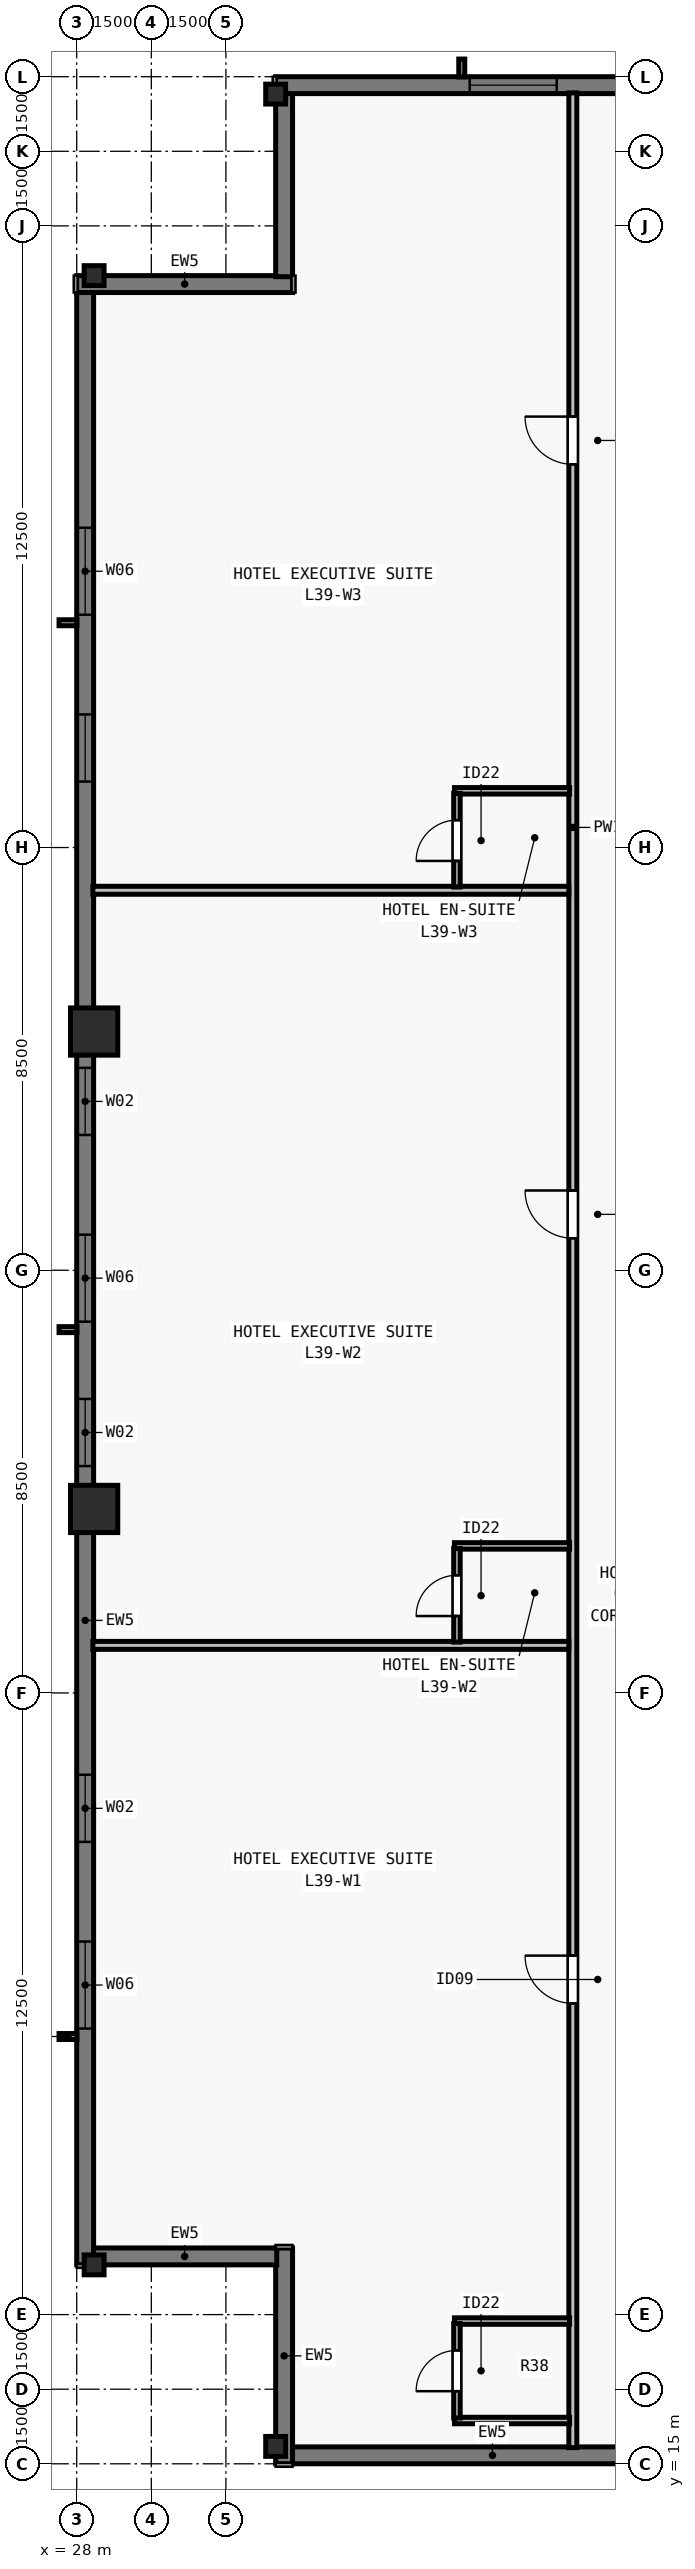
"""IFC4 building model, lengths in metres.
Left out: names, types, materials, properties, quantities, classifications, styles, units other than length and angle.
Written with IfcOpenShell. Run it as: python <this file> out.ifc"""

import sys

from ifc_helpers import new_model, si_unit, direction, frame, frame_2d, origin, origin_2d, place, context, subcontext, project, spatial, rectangle, i_section, extrude, element, fill, save


model = new_model("IFC4")
c1 = context("Model", 3, precision=1e-05, world=origin(), true_north=direction((0.0, 1.0)))
c2 = subcontext(c1, "Body", "Model", "MODEL_VIEW")
j1 = project(units=[si_unit("LENGTHUNIT", "METRE"), si_unit("PLANEANGLEUNIT", "RADIAN")], contexts=[c1])
p1 = place(None, origin())
s1 = spatial("IfcSite", under=j1, at=p1, CompositionType="ELEMENT")
p2 = place(p1, origin())
s2 = spatial("IfcBuilding", under=s1, at=p2, CompositionType="ELEMENT")
p3 = place(p2, frame((0.0, 0.0, 144.5)))
s3 = spatial("IfcBuildingStorey", under=s2, at=p3, CompositionType="ELEMENT", Elevation=144.5)
for number, where, z_axis, x_axis in (
    (1, (32.0, 15.35, 0.0), (0.0, 0.0, 1.0), (1.0, 0.0, 0.0)),
    (2, (32.0, 62.65, 0.0), (0.0, 0.0, 1.0), (1.0, 0.0, 0.0)),
    (3, (28.35, 59.0, 0.0), (0.0, 0.0, 1.0), (0.0, 1.0, 0.0)),
):
    element("IfcColumn", number, at=place(p3, frame(where, z_axis=z_axis, x_axis=x_axis)), inside=s3, PredefinedType="COLUMN", context=c2, shape_type="SweptSolid", body=[
        extrude(i_section(OverallWidth=0.4, OverallDepth=0.4, WebThickness=0.022, FlangeThickness=0.036, at=origin_2d()), origin(), (0.0, 0.0, 1.0), 3.5),
    ])
for number, where, z_axis, x_axis in (
    (4, (28.35, 43.8, 0.0), (0.0, 0.0, 1.0), (0.0, 1.0, 0.0)),
    (5, (28.35, 34.2, 0.0), (0.0, 0.0, 1.0), (0.0, 1.0, 0.0)),
):
    element("IfcColumn", number, at=place(p3, frame(where, z_axis=z_axis, x_axis=x_axis)), inside=s3, PredefinedType="COLUMN", context=c2, shape_type="SweptSolid", body=[
        extrude(rectangle(XDim=0.95, YDim=0.95, at=origin_2d()), origin(), (0.0, 0.0, 1.0), 3.5),
    ])
p4 = place(p3, frame((28.35, 19.0, 0.0), z_axis=(0.0, 0.0, 1.0), x_axis=(0.0, 1.0, 0.0)))
e6 = element("IfcColumn", 6, at=p4, inside=s3, PredefinedType="COLUMN", context=c2, shape_type="SweptSolid", body=[
    extrude(i_section(OverallWidth=0.4, OverallDepth=0.4, WebThickness=0.022, FlangeThickness=0.036, at=origin_2d()), origin(), (0.0, 0.0, 1.0), 3.5),
])
p5 = place(p3, frame((40.4, 15.17, 0.0), z_axis=(0.0, 0.0, 1.0), x_axis=(-1.0, 0.0, 0.0)))
e7 = element("IfcWall", 7, at=p5, inside=s3, PredefinedType="SOLIDWALL", context=c2, shape_type="SweptSolid", body=[
    extrude(rectangle(XDim=8.082, YDim=0.34, at=frame_2d((4.041, 0.0))), origin(), (0.0, 0.0, 1.0), 3.28),
])
p6 = place(p3, frame((32.17, 15.0, 0.0), z_axis=(0.0, 0.0, 1.0), x_axis=(0.0, 1.0, 0.0)))
e8 = element("IfcWall", 8, at=p6, inside=s3, PredefinedType="SOLIDWALL", context=c2, shape_type="SweptSolid", body=[
    extrude(rectangle(XDim=4.34, YDim=0.34, at=frame_2d((2.17, 0.0))), origin(), (0.0, 0.0, 1.0), 3.28),
])
p7 = place(p3, frame((32.022, 19.17, 0.0), z_axis=(0.0, 0.0, 1.0), x_axis=(-1.0, 0.0, 0.0)))
e9 = element("IfcWall", 9, at=p7, inside=s3, PredefinedType="SOLIDWALL", context=c2, shape_type="SweptSolid", body=[
    extrude(rectangle(XDim=3.704, YDim=0.34, at=frame_2d((1.852, 0.0))), origin(), (0.0, 0.0, 1.0), 3.28),
])
p8 = place(p3, frame((28.17, 19.0, 0.0), z_axis=(0.0, 0.0, 1.0), x_axis=(0.0, 1.0, 0.0)))
e10 = element("IfcWall", 10, at=p8, inside=s3, PredefinedType="SOLIDWALL", context=c2, shape_type="SweptSolid", body=[
    extrude(rectangle(XDim=39.682, YDim=0.34, at=frame_2d((19.841, 0.0))), origin(), (0.0, 0.0, 1.0), 3.28),
])
p9 = place(p8, frame((4.752, 0.0, 0.8)))
e11 = element("IfcOpeningElement", 11, at=p9, cuts=e10, PredefinedType="OPENING", context=c2, shape_type="SweptSolid", body=[
    extrude(rectangle(XDim=1.75, YDim=1.66, at=frame_2d((0.875, 0.83))), frame((0.0, 0.18, 0.0), z_axis=(0.0, -1.0, 0.0), x_axis=(1.0, 0.0, 0.0)), (0.0, 0.0, 1.0), 0.36),
])
p10 = place(p8, frame((8.505, 0.0, 0.8)))
e12 = element("IfcOpeningElement", 12, at=p10, cuts=e10, PredefinedType="OPENING", context=c2, shape_type="SweptSolid", body=[
    extrude(rectangle(XDim=1.35, YDim=1.66, at=frame_2d((0.675, 0.83))), frame((0.0, 0.18, 0.0), z_axis=(0.0, -1.0, 0.0), x_axis=(1.0, 0.0, 0.0)), (0.0, 0.0, 1.0), 0.36),
])
p11 = place(p8, frame((16.062, 0.0, 0.8)))
e13 = element("IfcOpeningElement", 13, at=p11, cuts=e10, PredefinedType="OPENING", context=c2, shape_type="SweptSolid", body=[
    extrude(rectangle(XDim=1.35, YDim=1.66, at=frame_2d((0.675, 0.83))), frame((0.0, 0.18, 0.0), z_axis=(0.0, -1.0, 0.0), x_axis=(1.0, 0.0, 0.0)), (0.0, 0.0, 1.0), 0.36),
])
p12 = place(p8, frame((18.966, 0.0, 0.8)))
e14 = element("IfcOpeningElement", 14, at=p12, cuts=e10, PredefinedType="OPENING", context=c2, shape_type="SweptSolid", body=[
    extrude(rectangle(XDim=1.75, YDim=1.66, at=frame_2d((0.875, 0.83))), frame((0.0, 0.18, 0.0), z_axis=(0.0, -1.0, 0.0), x_axis=(1.0, 0.0, 0.0)), (0.0, 0.0, 1.0), 0.36),
])
p13 = place(p8, frame((22.719, 0.0, 0.8)))
e15 = element("IfcOpeningElement", 15, at=p13, cuts=e10, PredefinedType="OPENING", context=c2, shape_type="SweptSolid", body=[
    extrude(rectangle(XDim=1.35, YDim=1.66, at=frame_2d((0.675, 0.83))), frame((0.0, 0.18, 0.0), z_axis=(0.0, -1.0, 0.0), x_axis=(1.0, 0.0, 0.0)), (0.0, 0.0, 1.0), 0.36),
])
p14 = place(p8, frame((29.827, 0.0, 0.8)))
e16 = element("IfcOpeningElement", 16, at=p14, cuts=e10, PredefinedType="OPENING", context=c2, shape_type="SweptSolid", body=[
    extrude(rectangle(XDim=1.35, YDim=1.66, at=frame_2d((0.675, 0.83))), frame((0.0, 0.18, 0.0), z_axis=(0.0, -1.0, 0.0), x_axis=(1.0, 0.0, 0.0)), (0.0, 0.0, 1.0), 0.36),
])
p15 = place(p8, frame((33.18, 0.0, 0.8)))
e17 = element("IfcOpeningElement", 17, at=p15, cuts=e10, PredefinedType="OPENING", context=c2, shape_type="SweptSolid", body=[
    extrude(rectangle(XDim=1.75, YDim=1.66, at=frame_2d((0.875, 0.83))), frame((0.0, 0.18, 0.0), z_axis=(0.0, -1.0, 0.0), x_axis=(1.0, 0.0, 0.0)), (0.0, 0.0, 1.0), 0.36),
])
p16 = place(p3, frame((28.0, 58.83, 0.0), z_axis=(0.0, 0.0, 1.0), x_axis=(1.0, 0.0, 0.0)))
e18 = element("IfcWall", 18, at=p16, inside=s3, PredefinedType="SOLIDWALL", context=c2, shape_type="SweptSolid", body=[
    extrude(rectangle(XDim=4.34, YDim=0.34, at=frame_2d((2.17, 0.0))), origin(), (0.0, 0.0, 1.0), 3.28),
])
p17 = place(p3, frame((32.17, 58.978, 0.0), z_axis=(0.0, 0.0, 1.0), x_axis=(0.0, 1.0, 0.0)))
e19 = element("IfcWall", 19, at=p17, inside=s3, PredefinedType="SOLIDWALL", context=c2, shape_type="SweptSolid", body=[
    extrude(rectangle(XDim=3.704, YDim=0.34, at=frame_2d((1.852, 0.0))), origin(), (0.0, 0.0, 1.0), 3.28),
])
p18 = place(p3, frame((32.0, 62.83, 0.0), z_axis=(0.0, 0.0, 1.0), x_axis=(1.0, 0.0, 0.0)))
e20 = element("IfcWall", 20, at=p18, inside=s3, PredefinedType="SOLIDWALL", context=c2, shape_type="SweptSolid", body=[
    extrude(rectangle(XDim=39.682, YDim=0.34, at=frame_2d((19.841, 0.0))), origin(), (0.0, 0.0, 1.0), 3.28),
])
p19 = place(p18, frame((3.902, 0.0, 0.8)))
e21 = element("IfcOpeningElement", 21, at=p19, cuts=e20, PredefinedType="OPENING", context=c2, shape_type="SweptSolid", body=[
    extrude(rectangle(XDim=1.75, YDim=1.66, at=frame_2d((0.875, 0.83))), frame((0.0, 0.18, 0.0), z_axis=(0.0, -1.0, 0.0), x_axis=(1.0, 0.0, 0.0)), (0.0, 0.0, 1.0), 0.36),
])
p20 = place(p18, frame((8.505, 0.0, 0.8)))
e22 = element("IfcOpeningElement", 22, at=p20, cuts=e20, PredefinedType="OPENING", context=c2, shape_type="SweptSolid", body=[
    extrude(rectangle(XDim=1.35, YDim=1.66, at=frame_2d((0.675, 0.83))), frame((0.0, 0.18, 0.0), z_axis=(0.0, -1.0, 0.0), x_axis=(1.0, 0.0, 0.0)), (0.0, 0.0, 1.0), 0.36),
])
p21 = place(p18, frame((11.859, 0.0, 0.8)))
e23 = element("IfcOpeningElement", 23, at=p21, cuts=e20, PredefinedType="OPENING", context=c2, shape_type="SweptSolid", body=[
    extrude(rectangle(XDim=1.75, YDim=1.66, at=frame_2d((0.875, 0.83))), frame((0.0, 0.18, 0.0), z_axis=(0.0, -1.0, 0.0), x_axis=(1.0, 0.0, 0.0)), (0.0, 0.0, 1.0), 0.36),
])
p22 = place(p18, frame((16.062, 0.0, 0.8)))
e24 = element("IfcOpeningElement", 24, at=p22, cuts=e20, PredefinedType="OPENING", context=c2, shape_type="SweptSolid", body=[
    extrude(rectangle(XDim=1.35, YDim=1.66, at=frame_2d((0.675, 0.83))), frame((0.0, 0.18, 0.0), z_axis=(0.0, -1.0, 0.0), x_axis=(1.0, 0.0, 0.0)), (0.0, 0.0, 1.0), 0.36),
])
p23 = place(p18, frame((17.716, 0.0, 0.8)))
e25 = element("IfcOpeningElement", 25, at=p23, cuts=e20, PredefinedType="OPENING", context=c2, shape_type="SweptSolid", body=[
    extrude(rectangle(XDim=1.75, YDim=1.66, at=frame_2d((0.875, 0.83))), frame((0.0, 0.18, 0.0), z_axis=(0.0, -1.0, 0.0), x_axis=(1.0, 0.0, 0.0)), (0.0, 0.0, 1.0), 0.36),
])
p24 = place(p18, frame((22.719, 0.0, 0.8)))
e26 = element("IfcOpeningElement", 26, at=p24, cuts=e20, PredefinedType="OPENING", context=c2, shape_type="SweptSolid", body=[
    extrude(rectangle(XDim=1.35, YDim=1.66, at=frame_2d((0.675, 0.83))), frame((0.0, 0.18, 0.0), z_axis=(0.0, -1.0, 0.0), x_axis=(1.0, 0.0, 0.0)), (0.0, 0.0, 1.0), 0.36),
])
p25 = place(p18, frame((26.073, 0.0, 0.8)))
e27 = element("IfcOpeningElement", 27, at=p25, cuts=e20, PredefinedType="OPENING", context=c2, shape_type="SweptSolid", body=[
    extrude(rectangle(XDim=1.75, YDim=1.66, at=frame_2d((0.875, 0.83))), frame((0.0, 0.18, 0.0), z_axis=(0.0, -1.0, 0.0), x_axis=(1.0, 0.0, 0.0)), (0.0, 0.0, 1.0), 0.36),
])
p26 = place(p18, frame((30.677, 0.0, 0.8)))
e28 = element("IfcOpeningElement", 28, at=p26, cuts=e20, PredefinedType="OPENING", context=c2, shape_type="SweptSolid", body=[
    extrude(rectangle(XDim=1.35, YDim=1.66, at=frame_2d((0.675, 0.83))), frame((0.0, 0.18, 0.0), z_axis=(0.0, -1.0, 0.0), x_axis=(1.0, 0.0, 0.0)), (0.0, 0.0, 1.0), 0.36),
])
p27 = place(p18, frame((33.18, 0.0, 0.8)))
e29 = element("IfcOpeningElement", 29, at=p27, cuts=e20, PredefinedType="OPENING", context=c2, shape_type="SweptSolid", body=[
    extrude(rectangle(XDim=1.75, YDim=1.66, at=frame_2d((0.875, 0.83))), frame((0.0, 0.18, 0.0), z_axis=(0.0, -1.0, 0.0), x_axis=(1.0, 0.0, 0.0)), (0.0, 0.0, 1.0), 0.36),
])
p28 = place(p3, frame((37.975, 15.325, 0.0), z_axis=(0.0, 0.0, 1.0), x_axis=(0.0, 1.0, 0.0)))
e30 = element("IfcWall", 30, at=p28, inside=s3, PredefinedType="PARTITIONING", context=c2, shape_type="SweptSolid", body=[
    extrude(rectangle(XDim=47.35, YDim=0.16, at=frame_2d((23.675, 0.0))), origin(), (0.0, 0.0, 1.0), 2.555),
])
p29 = place(p28, frame((8.934, 0.0, 0.0)))
e31 = element("IfcOpeningElement", 31, at=p29, cuts=e30, PredefinedType="OPENING", context=c2, shape_type="SweptSolid", body=[
    extrude(rectangle(XDim=0.96, YDim=2.15, at=frame_2d((0.48, 1.075))), frame((0.0, 0.09, 0.0), z_axis=(0.0, -1.0, 0.0), x_axis=(1.0, 0.0, 0.0)), (0.0, 0.0, 1.0), 0.18),
])
p30 = place(p28, frame((24.319, 0.0, 0.0)))
e32 = element("IfcOpeningElement", 32, at=p30, cuts=e30, PredefinedType="OPENING", context=c2, shape_type="SweptSolid", body=[
    extrude(rectangle(XDim=0.96, YDim=2.15, at=frame_2d((0.48, 1.075))), frame((0.0, 0.09, 0.0), z_axis=(0.0, -1.0, 0.0), x_axis=(1.0, 0.0, 0.0)), (0.0, 0.0, 1.0), 0.18),
])
p31 = place(p28, frame((39.88, 0.0, 0.0)))
e33 = element("IfcOpeningElement", 33, at=p31, cuts=e30, PredefinedType="OPENING", context=c2, shape_type="SweptSolid", body=[
    extrude(rectangle(XDim=0.96, YDim=2.15, at=frame_2d((0.48, 1.075))), frame((0.0, 0.09, 0.0), z_axis=(0.0, -1.0, 0.0), x_axis=(1.0, 0.0, 0.0)), (0.0, 0.0, 1.0), 0.18),
])
for number, where, z_axis, x_axis in (
    (34, (35.595, 15.87, 0.0), (0.0, 0.0, 1.0), (1.0, 0.0, 0.0)),
    (35, (35.595, 17.87, 0.0), (0.0, 0.0, 1.0), (1.0, 0.0, 0.0)),
):
    element("IfcWall", number, at=place(p3, frame(where, z_axis=z_axis, x_axis=x_axis)), inside=s3, PredefinedType="PLUMBINGWALL", context=c2, shape_type="SweptSolid", body=[
        extrude(rectangle(XDim=2.315, YDim=0.13, at=frame_2d((1.157, 0.0))), origin(), (0.0, 0.0, 1.0), 3.28),
    ])
p32 = place(p3, frame((35.645, 15.92, 0.0), z_axis=(0.0, 0.0, 1.0), x_axis=(0.0, 1.0, 0.0)))
e36 = element("IfcWall", 36, at=p32, inside=s3, PredefinedType="PLUMBINGWALL", context=c2, shape_type="SweptSolid", body=[
    extrude(rectangle(XDim=1.9, YDim=0.13, at=frame_2d((0.95, 0.0))), origin(), (0.0, 0.0, 1.0), 3.28),
])
p33 = place(p32, frame((0.54, 0.0, 0.0)))
e37 = element("IfcOpeningElement", 37, at=p33, cuts=e36, PredefinedType="OPENING", context=c2, shape_type="SweptSolid", body=[
    extrude(rectangle(XDim=0.82, YDim=2.1, at=frame_2d((0.41, 1.05))), frame((0.0, 0.075, 0.0), z_axis=(0.0, -1.0, 0.0), x_axis=(1.0, 0.0, 0.0)), (0.0, 0.0, 1.0), 0.15),
])
p34 = place(p3, frame((28.325, 31.457, 0.0), z_axis=(0.0, 0.0, 1.0), x_axis=(1.0, 0.0, 0.0)))
e38 = element("IfcWall", 38, at=p34, inside=s3, PredefinedType="PARTITIONING", context=c2, shape_type="SweptSolid", body=[
    extrude(rectangle(XDim=9.57, YDim=0.16, at=frame_2d((4.785, 0.0))), origin(), (0.0, 0.0, 1.0), 3.28),
])
p35 = place(p3, frame((35.595, 33.457, 0.0), z_axis=(0.0, 0.0, 1.0), x_axis=(1.0, 0.0, 0.0)))
e39 = element("IfcWall", 39, at=p35, inside=s3, PredefinedType="PLUMBINGWALL", context=c2, shape_type="SweptSolid", body=[
    extrude(rectangle(XDim=2.315, YDim=0.13, at=frame_2d((1.157, 0.0))), origin(), (0.0, 0.0, 1.0), 3.28),
])
p36 = place(p3, frame((35.645, 31.522, 0.0), z_axis=(0.0, 0.0, 1.0), x_axis=(0.0, 1.0, 0.0)))
e40 = element("IfcWall", 40, at=p36, inside=s3, PredefinedType="PLUMBINGWALL", context=c2, shape_type="SweptSolid", body=[
    extrude(rectangle(XDim=1.885, YDim=0.13, at=frame_2d((0.942, 0.0))), origin(), (0.0, 0.0, 1.0), 3.28),
])
p37 = place(p36, frame((0.525, 0.0, 0.0)))
e41 = element("IfcOpeningElement", 41, at=p37, cuts=e40, PredefinedType="OPENING", context=c2, shape_type="SweptSolid", body=[
    extrude(rectangle(XDim=0.82, YDim=2.1, at=frame_2d((0.41, 1.05))), frame((0.0, 0.075, 0.0), z_axis=(0.0, -1.0, 0.0), x_axis=(1.0, 0.0, 0.0)), (0.0, 0.0, 1.0), 0.15),
])
p38 = place(p3, frame((28.325, 46.641, 0.0), z_axis=(0.0, 0.0, 1.0), x_axis=(1.0, 0.0, 0.0)))
e42 = element("IfcWall", 42, at=p38, inside=s3, PredefinedType="PARTITIONING", context=c2, shape_type="SweptSolid", body=[
    extrude(rectangle(XDim=9.57, YDim=0.16, at=frame_2d((4.785, 0.0))), origin(), (0.0, 0.0, 1.0), 3.28),
])
p39 = place(p3, frame((35.595, 48.641, 0.0), z_axis=(0.0, 0.0, 1.0), x_axis=(1.0, 0.0, 0.0)))
e43 = element("IfcWall", 43, at=p39, inside=s3, PredefinedType="PLUMBINGWALL", context=c2, shape_type="SweptSolid", body=[
    extrude(rectangle(XDim=2.315, YDim=0.13, at=frame_2d((1.157, 0.0))), origin(), (0.0, 0.0, 1.0), 3.28),
])
p40 = place(p3, frame((35.645, 46.706, 0.0), z_axis=(0.0, 0.0, 1.0), x_axis=(0.0, 1.0, 0.0)))
e44 = element("IfcWall", 44, at=p40, inside=s3, PredefinedType="PLUMBINGWALL", context=c2, shape_type="SweptSolid", body=[
    extrude(rectangle(XDim=1.885, YDim=0.13, at=frame_2d((0.942, 0.0))), origin(), (0.0, 0.0, 1.0), 3.28),
])
p41 = place(p40, frame((0.525, 0.0, 0.0)))
e45 = element("IfcOpeningElement", 45, at=p41, cuts=e44, PredefinedType="OPENING", context=c2, shape_type="SweptSolid", body=[
    extrude(rectangle(XDim=0.82, YDim=2.1, at=frame_2d((0.41, 1.05))), frame((0.0, 0.075, 0.0), z_axis=(0.0, -1.0, 0.0), x_axis=(1.0, 0.0, 0.0)), (0.0, 0.0, 1.0), 0.15),
])
p42 = place(p9, origin())
e46 = element("IfcWindow", 46, at=p42, inside=s3, PartitioningType="SINGLE_PANEL", PredefinedType="WINDOW", context=c2, shape_type="SweptSolid", body=[
    extrude(rectangle(XDim=1.75, YDim=1.66, at=frame_2d((0.875, 0.83))), frame((0.0, -0.05, 0.0), z_axis=(0.0, -1.0, 0.0), x_axis=(1.0, 0.0, 0.0)), (0.0, 0.0, 1.0), 0.06),
])
fill(e11, e46)
p43 = place(p10, origin())
e47 = element("IfcWindow", 47, at=p43, inside=s3, PartitioningType="SINGLE_PANEL", PredefinedType="WINDOW", context=c2, shape_type="SweptSolid", body=[
    extrude(rectangle(XDim=1.35, YDim=1.66, at=frame_2d((0.675, 0.83))), frame((0.0, -0.05, 0.0), z_axis=(0.0, -1.0, 0.0), x_axis=(1.0, 0.0, 0.0)), (0.0, 0.0, 1.0), 0.06),
])
fill(e12, e47)
p44 = place(p11, origin())
e48 = element("IfcWindow", 48, at=p44, inside=s3, PartitioningType="SINGLE_PANEL", PredefinedType="WINDOW", context=c2, shape_type="SweptSolid", body=[
    extrude(rectangle(XDim=1.35, YDim=1.66, at=frame_2d((0.675, 0.83))), frame((0.0, -0.05, 0.0), z_axis=(0.0, -1.0, 0.0), x_axis=(1.0, 0.0, 0.0)), (0.0, 0.0, 1.0), 0.06),
])
fill(e13, e48)
p45 = place(p12, origin())
e49 = element("IfcWindow", 49, at=p45, inside=s3, PartitioningType="SINGLE_PANEL", PredefinedType="WINDOW", context=c2, shape_type="SweptSolid", body=[
    extrude(rectangle(XDim=1.75, YDim=1.66, at=frame_2d((0.875, 0.83))), frame((0.0, -0.05, 0.0), z_axis=(0.0, -1.0, 0.0), x_axis=(1.0, 0.0, 0.0)), (0.0, 0.0, 1.0), 0.06),
])
fill(e14, e49)
p46 = place(p13, origin())
e50 = element("IfcWindow", 50, at=p46, inside=s3, PartitioningType="SINGLE_PANEL", PredefinedType="WINDOW", context=c2, shape_type="SweptSolid", body=[
    extrude(rectangle(XDim=1.35, YDim=1.66, at=frame_2d((0.675, 0.83))), frame((0.0, -0.05, 0.0), z_axis=(0.0, -1.0, 0.0), x_axis=(1.0, 0.0, 0.0)), (0.0, 0.0, 1.0), 0.06),
])
fill(e15, e50)
p47 = place(p14, origin())
e51 = element("IfcWindow", 51, at=p47, inside=s3, PartitioningType="SINGLE_PANEL", PredefinedType="WINDOW", context=c2, shape_type="SweptSolid", body=[
    extrude(rectangle(XDim=1.35, YDim=1.66, at=frame_2d((0.675, 0.83))), frame((0.0, -0.05, 0.0), z_axis=(0.0, -1.0, 0.0), x_axis=(1.0, 0.0, 0.0)), (0.0, 0.0, 1.0), 0.06),
])
fill(e16, e51)
p48 = place(p15, origin())
e52 = element("IfcWindow", 52, at=p48, inside=s3, PartitioningType="SINGLE_PANEL", PredefinedType="WINDOW", context=c2, shape_type="SweptSolid", body=[
    extrude(rectangle(XDim=1.75, YDim=1.66, at=frame_2d((0.875, 0.83))), frame((0.0, -0.05, 0.0), z_axis=(0.0, -1.0, 0.0), x_axis=(1.0, 0.0, 0.0)), (0.0, 0.0, 1.0), 0.06),
])
fill(e17, e52)
p49 = place(p19, origin())
e53 = element("IfcWindow", 53, at=p49, inside=s3, PartitioningType="SINGLE_PANEL", PredefinedType="WINDOW", context=c2, shape_type="SweptSolid", body=[
    extrude(rectangle(XDim=1.75, YDim=1.66, at=frame_2d((0.875, 0.83))), frame((0.0, -0.05, 0.0), z_axis=(0.0, -1.0, 0.0), x_axis=(1.0, 0.0, 0.0)), (0.0, 0.0, 1.0), 0.06),
])
fill(e21, e53)
p50 = place(p33, origin())
e54 = element("IfcDoor", 54, at=p50, inside=s3, OperationType="SINGLE_SWING_LEFT", PredefinedType="DOOR", context=c2, shape_type="SweptSolid", body=[
    extrude(rectangle(XDim=0.82, YDim=2.1, at=frame_2d((0.41, 1.05))), frame((0.0, 0.025, 0.0), z_axis=(0.0, -1.0, 0.0), x_axis=(1.0, 0.0, 0.0)), (0.0, 0.0, 1.0), 0.05),
])
fill(e37, e54)
p51 = place(p29, origin())
e55 = element("IfcDoor", 55, at=p51, inside=s3, OperationType="SINGLE_SWING_RIGHT", PredefinedType="DOOR", context=c2, shape_type="SweptSolid", body=[
    extrude(rectangle(XDim=0.96, YDim=2.15, at=frame_2d((0.48, 1.075))), frame((0.0, 0.025, 0.0), z_axis=(0.0, -1.0, 0.0), x_axis=(1.0, 0.0, 0.0)), (0.0, 0.0, 1.0), 0.05),
])
fill(e31, e55)
p52 = place(p37, origin())
e56 = element("IfcDoor", 56, at=p52, inside=s3, OperationType="SINGLE_SWING_LEFT", PredefinedType="DOOR", context=c2, shape_type="SweptSolid", body=[
    extrude(rectangle(XDim=0.82, YDim=2.1, at=frame_2d((0.41, 1.05))), frame((0.0, 0.025, 0.0), z_axis=(0.0, -1.0, 0.0), x_axis=(1.0, 0.0, 0.0)), (0.0, 0.0, 1.0), 0.05),
])
fill(e41, e56)
p53 = place(p30, origin())
e57 = element("IfcDoor", 57, at=p53, inside=s3, OperationType="SINGLE_SWING_RIGHT", PredefinedType="DOOR", context=c2, shape_type="SweptSolid", body=[
    extrude(rectangle(XDim=0.96, YDim=2.15, at=frame_2d((0.48, 1.075))), frame((0.0, 0.025, 0.0), z_axis=(0.0, -1.0, 0.0), x_axis=(1.0, 0.0, 0.0)), (0.0, 0.0, 1.0), 0.05),
])
fill(e32, e57)
p54 = place(p41, origin())
e58 = element("IfcDoor", 58, at=p54, inside=s3, OperationType="SINGLE_SWING_LEFT", PredefinedType="DOOR", context=c2, shape_type="SweptSolid", body=[
    extrude(rectangle(XDim=0.82, YDim=2.1, at=frame_2d((0.41, 1.05))), frame((0.0, 0.025, 0.0), z_axis=(0.0, -1.0, 0.0), x_axis=(1.0, 0.0, 0.0)), (0.0, 0.0, 1.0), 0.05),
])
fill(e45, e58)
p55 = place(p31, origin())
e59 = element("IfcDoor", 59, at=p55, inside=s3, OperationType="SINGLE_SWING_RIGHT", PredefinedType="DOOR", context=c2, shape_type="SweptSolid", body=[
    extrude(rectangle(XDim=0.96, YDim=2.15, at=frame_2d((0.48, 1.075))), frame((0.0, 0.025, 0.0), z_axis=(0.0, -1.0, 0.0), x_axis=(1.0, 0.0, 0.0)), (0.0, 0.0, 1.0), 0.05),
])
fill(e33, e59)
save(model, sys.argv[1])
